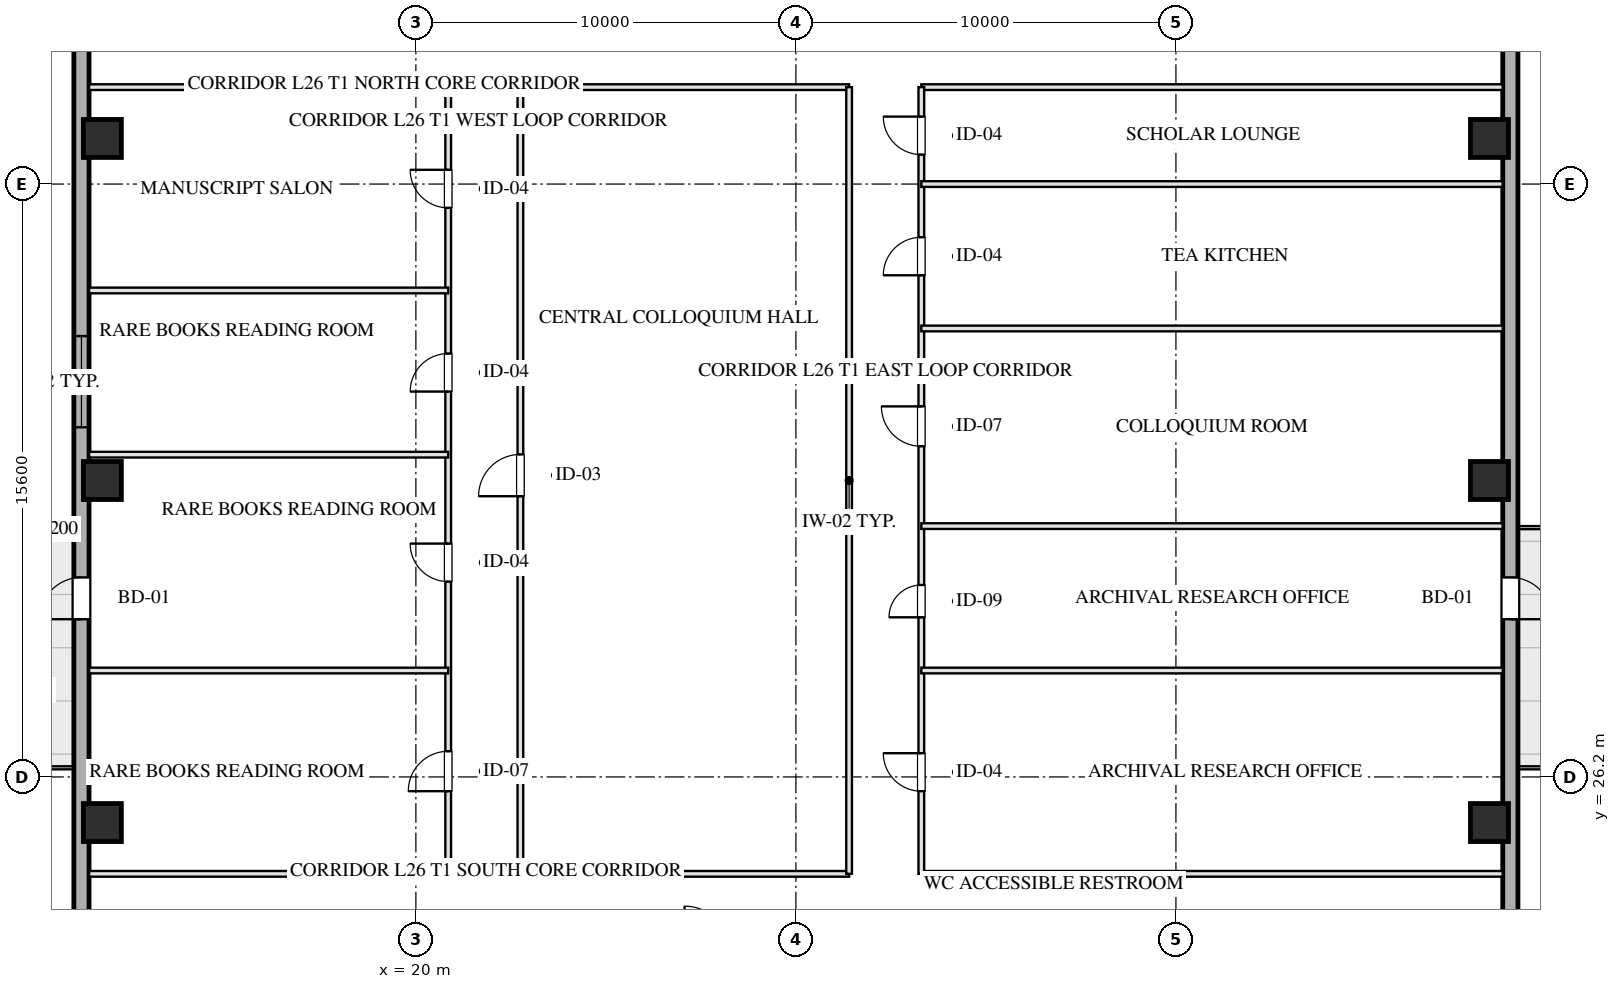
"""IFC4 building model, lengths in metres.
Left out: names, types, materials, properties, quantities, classifications, styles, units other than length and angle.
Written with IfcOpenShell. Run it as: python <this file> out.ifc"""

import sys

from ifc_helpers import new_model, si_unit, direction, frame, frame_2d, origin, origin_2d, place, context, subcontext, project, spatial, rectangle, hollow_rectangle, extrude, element, fill, save


model = new_model("IFC4")
c1 = context("Model", 3, precision=1e-05, world=origin(), true_north=direction((0.0, 1.0)))
c2 = subcontext(c1, "Body", "Model", "MODEL_VIEW")
j1 = project(units=[si_unit("LENGTHUNIT", "METRE"), si_unit("PLANEANGLEUNIT", "RADIAN")], contexts=[c1])
p1 = place(None, origin())
s1 = spatial("IfcSite", under=j1, at=p1, CompositionType="ELEMENT")
p2 = place(p1, origin())
s2 = spatial("IfcBuilding", under=s1, at=p2, CompositionType="ELEMENT")
p3 = place(p2, frame((0.0, 0.0, 103.5)))
s3 = spatial("IfcBuildingStorey", under=s2, at=p3, CompositionType="ELEMENT", Elevation=103.5)
for number, where, z_axis, x_axis in (
    (1, (11.75, 25.0, 0.0), (0.0, 0.0, 1.0), (1.0, 0.0, 0.0)),
    (2, (11.75, 34.0, 0.0), (0.0, 0.0, 1.0), (1.0, 0.0, 0.0)),
    (3, (11.75, 43.0, 0.0), (0.0, 0.0, 1.0), (1.0, 0.0, 0.0)),
    (4, (48.25, 25.0, 0.0), (0.0, 0.0, 1.0), (1.0, 0.0, 0.0)),
    (5, (48.25, 34.0, 0.0), (0.0, 0.0, 1.0), (1.0, 0.0, 0.0)),
    (6, (48.25, 43.0, 0.0), (0.0, 0.0, 1.0), (1.0, 0.0, 0.0)),
):
    element("IfcColumn", number, at=place(p3, frame(where, z_axis=z_axis, x_axis=x_axis)), inside=s3, PredefinedType="COLUMN", context=c2, shape_type="SweptSolid", body=[
        extrude(hollow_rectangle(XDim=1.0, YDim=1.0, WallThickness=0.036, at=origin_2d()), origin(), (0.0, 0.0, 1.0), 3.451),
    ])
p4 = place(p3, frame((11.2, 9.0, 0.0), z_axis=(0.0, 0.0, 1.0), x_axis=(0.0, 1.0, 0.0)))
e7 = element("IfcWall", 7, at=p4, inside=s3, PredefinedType="SOLIDWALL", context=c2, shape_type="SweptSolid", body=[
    extrude(rectangle(XDim=50.0, YDim=0.4, at=frame_2d((25.0, 0.0))), origin(), (0.0, 0.0, 1.0), 2.61),
])
p5 = place(p4, frame((26.4, 0.0, 0.75)))
e8 = element("IfcOpeningElement", 8, at=p5, cuts=e7, PredefinedType="OPENING", context=c2, shape_type="SweptSolid", body=[
    extrude(rectangle(XDim=2.4, YDim=1.46, at=frame_2d((1.2, 0.73))), frame((0.0, 0.21, 0.0), z_axis=(0.0, -1.0, 0.0), x_axis=(1.0, 0.0, 0.0)), (0.0, 0.0, 1.0), 0.42),
])
p6 = place(p4, frame((21.35, 0.0, 0.0)))
e9 = element("IfcOpeningElement", 9, at=p6, cuts=e7, PredefinedType="OPENING", context=c2, shape_type="SweptSolid", body=[
    extrude(rectangle(XDim=1.1, YDim=2.15, at=frame_2d((0.55, 1.075))), frame((0.0, 0.21, 0.0), z_axis=(0.0, -1.0, 0.0), x_axis=(1.0, 0.0, 0.0)), (0.0, 0.0, 1.0), 0.42),
])
p7 = place(p3, frame((48.8, 59.0, 0.0), z_axis=(0.0, 0.0, 1.0), x_axis=(0.0, -1.0, 0.0)))
e10 = element("IfcWall", 10, at=p7, inside=s3, PredefinedType="SOLIDWALL", context=c2, shape_type="SweptSolid", body=[
    extrude(rectangle(XDim=50.0, YDim=0.4, at=frame_2d((25.0, 0.0))), origin(), (0.0, 0.0, 1.0), 2.61),
])
p8 = place(p7, frame((27.55, 0.0, 0.0)))
e11 = element("IfcOpeningElement", 11, at=p8, cuts=e10, PredefinedType="OPENING", context=c2, shape_type="SweptSolid", body=[
    extrude(rectangle(XDim=1.1, YDim=2.15, at=frame_2d((0.55, 1.075))), frame((0.0, 0.21, 0.0), z_axis=(0.0, -1.0, 0.0), x_axis=(1.0, 0.0, 0.0)), (0.0, 0.0, 1.0), 0.42),
])
p9 = place(p3, frame((11.4, 23.65, 0.0), z_axis=(0.0, 0.0, 1.0), x_axis=(1.0, 0.0, 0.0)))
e12 = element("IfcWall", 12, at=p9, inside=s3, PredefinedType="PARTITIONING", context=c2, shape_type="SweptSolid", body=[
    extrude(rectangle(XDim=9.45, YDim=0.15, at=frame_2d((4.725, 0.0))), origin(), (0.0, 0.0, 1.0), 3.175),
])
p10 = place(p3, frame((22.75, 23.65, 0.0), z_axis=(0.0, 0.0, 1.0), x_axis=(1.0, 0.0, 0.0)))
e13 = element("IfcWall", 13, at=p10, inside=s3, PredefinedType="PARTITIONING", context=c2, shape_type="SweptSolid", body=[
    extrude(rectangle(XDim=8.65, YDim=0.15, at=frame_2d((4.325, 0.0))), origin(), (0.0, 0.0, 1.0), 3.175),
])
p11 = place(p3, frame((33.3, 23.65, 0.0), z_axis=(0.0, 0.0, 1.0), x_axis=(1.0, 0.0, 0.0)))
e14 = element("IfcWall", 14, at=p11, inside=s3, PredefinedType="PARTITIONING", context=c2, shape_type="SweptSolid", body=[
    extrude(rectangle(XDim=15.3, YDim=0.15, at=frame_2d((7.65, 0.0))), origin(), (0.0, 0.0, 1.0), 3.175),
])
p12 = place(p3, frame((11.4, 44.35, 0.0), z_axis=(0.0, 0.0, 1.0), x_axis=(1.0, 0.0, 0.0)))
e15 = element("IfcWall", 15, at=p12, inside=s3, PredefinedType="PARTITIONING", context=c2, shape_type="SweptSolid", body=[
    extrude(rectangle(XDim=9.45, YDim=0.15, at=frame_2d((4.725, 0.0))), origin(), (0.0, 0.0, 1.0), 3.175),
])
p13 = place(p3, frame((22.75, 44.35, 0.0), z_axis=(0.0, 0.0, 1.0), x_axis=(1.0, 0.0, 0.0)))
e16 = element("IfcWall", 16, at=p13, inside=s3, PredefinedType="PARTITIONING", context=c2, shape_type="SweptSolid", body=[
    extrude(rectangle(XDim=8.65, YDim=0.15, at=frame_2d((4.325, 0.0))), origin(), (0.0, 0.0, 1.0), 3.175),
])
p14 = place(p3, frame((33.3, 44.35, 0.0), z_axis=(0.0, 0.0, 1.0), x_axis=(1.0, 0.0, 0.0)))
e17 = element("IfcWall", 17, at=p14, inside=s3, PredefinedType="PARTITIONING", context=c2, shape_type="SweptSolid", body=[
    extrude(rectangle(XDim=15.3, YDim=0.15, at=frame_2d((7.65, 0.0))), origin(), (0.0, 0.0, 1.0), 3.175),
])
p15 = place(p3, frame((20.85, 23.65, 0.0), z_axis=(0.0, 0.0, 1.0), x_axis=(0.0, 1.0, 0.0)))
e18 = element("IfcWall", 18, at=p15, inside=s3, PredefinedType="PARTITIONING", context=c2, shape_type="SweptSolid", body=[
    extrude(rectangle(XDim=20.7, YDim=0.15, at=frame_2d((10.35, 0.0))), origin(), (0.0, 0.0, 1.0), 3.175),
])
p16 = place(p15, frame((2.175, 0.0, 0.0)))
e19 = element("IfcOpeningElement", 19, at=p16, cuts=e18, PredefinedType="OPENING", context=c2, shape_type="SweptSolid", body=[
    extrude(rectangle(XDim=1.05, YDim=2.05, at=frame_2d((0.525, 1.025))), frame((0.0, 0.085, 0.0), z_axis=(0.0, -1.0, 0.0), x_axis=(1.0, 0.0, 0.0)), (0.0, 0.0, 1.0), 0.17),
])
p17 = place(p15, frame((7.69, 0.0, 0.0)))
e20 = element("IfcOpeningElement", 20, at=p17, cuts=e18, PredefinedType="OPENING", context=c2, shape_type="SweptSolid", body=[
    extrude(rectangle(XDim=1.0, YDim=2.05, at=frame_2d((0.5, 1.025))), frame((0.0, 0.085, 0.0), z_axis=(0.0, -1.0, 0.0), x_axis=(1.0, 0.0, 0.0)), (0.0, 0.0, 1.0), 0.17),
])
p18 = place(p15, frame((12.69, 0.0, 0.0)))
e21 = element("IfcOpeningElement", 21, at=p18, cuts=e18, PredefinedType="OPENING", context=c2, shape_type="SweptSolid", body=[
    extrude(rectangle(XDim=1.0, YDim=2.05, at=frame_2d((0.5, 1.025))), frame((0.0, 0.085, 0.0), z_axis=(0.0, -1.0, 0.0), x_axis=(1.0, 0.0, 0.0)), (0.0, 0.0, 1.0), 0.17),
])
p19 = place(p15, frame((17.525, 0.0, 0.0)))
e22 = element("IfcOpeningElement", 22, at=p19, cuts=e18, PredefinedType="OPENING", context=c2, shape_type="SweptSolid", body=[
    extrude(rectangle(XDim=1.0, YDim=2.05, at=frame_2d((0.5, 1.025))), frame((0.0, 0.085, 0.0), z_axis=(0.0, -1.0, 0.0), x_axis=(1.0, 0.0, 0.0)), (0.0, 0.0, 1.0), 0.17),
])
p20 = place(p3, frame((22.75, 23.65, 0.0), z_axis=(0.0, 0.0, 1.0), x_axis=(0.0, 1.0, 0.0)))
e23 = element("IfcWall", 23, at=p20, inside=s3, PredefinedType="PARTITIONING", context=c2, shape_type="SweptSolid", body=[
    extrude(rectangle(XDim=20.7, YDim=0.15, at=frame_2d((10.35, 0.0))), origin(), (0.0, 0.0, 1.0), 3.175),
])
p21 = place(p20, frame((9.936, 0.0, 0.0)))
e24 = element("IfcOpeningElement", 24, at=p21, cuts=e23, PredefinedType="OPENING", context=c2, shape_type="SweptSolid", body=[
    extrude(rectangle(XDim=1.1, YDim=2.05, at=frame_2d((0.55, 1.025))), frame((0.0, 0.085, 0.0), z_axis=(0.0, -1.0, 0.0), x_axis=(1.0, 0.0, 0.0)), (0.0, 0.0, 1.0), 0.17),
])
p22 = place(p3, frame((31.4, 23.65, 0.0), z_axis=(0.0, 0.0, 1.0), x_axis=(0.0, 1.0, 0.0)))
e25 = element("IfcWall", 25, at=p22, inside=s3, PredefinedType="PARTITIONING", context=c2, shape_type="SweptSolid", body=[
    extrude(rectangle(XDim=20.7, YDim=0.15, at=frame_2d((10.35, 0.0))), origin(), (0.0, 0.0, 1.0), 3.175),
])
p23 = place(p3, frame((33.3, 23.65, 0.0), z_axis=(0.0, 0.0, 1.0), x_axis=(0.0, 1.0, 0.0)))
e26 = element("IfcWall", 26, at=p23, inside=s3, PredefinedType="PARTITIONING", context=c2, shape_type="SweptSolid", body=[
    extrude(rectangle(XDim=20.7, YDim=0.15, at=frame_2d((10.35, 0.0))), origin(), (0.0, 0.0, 1.0), 3.175),
])
p24 = place(p23, frame((2.175, 0.0, 0.0)))
e27 = element("IfcOpeningElement", 27, at=p24, cuts=e26, PredefinedType="OPENING", context=c2, shape_type="SweptSolid", body=[
    extrude(rectangle(XDim=1.0, YDim=2.05, at=frame_2d((0.5, 1.025))), frame((0.0, 0.085, 0.0), z_axis=(0.0, -1.0, 0.0), x_axis=(1.0, 0.0, 0.0)), (0.0, 0.0, 1.0), 0.17),
])
p25 = place(p23, frame((6.75, 0.0, 0.0)))
e28 = element("IfcOpeningElement", 28, at=p25, cuts=e26, PredefinedType="OPENING", context=c2, shape_type="SweptSolid", body=[
    extrude(rectangle(XDim=0.85, YDim=2.05, at=frame_2d((0.425, 1.025))), frame((0.0, 0.085, 0.0), z_axis=(0.0, -1.0, 0.0), x_axis=(1.0, 0.0, 0.0)), (0.0, 0.0, 1.0), 0.17),
])
p26 = place(p23, frame((11.25, 0.0, 0.0)))
e29 = element("IfcOpeningElement", 29, at=p26, cuts=e26, PredefinedType="OPENING", context=c2, shape_type="SweptSolid", body=[
    extrude(rectangle(XDim=1.05, YDim=2.05, at=frame_2d((0.525, 1.025))), frame((0.0, 0.085, 0.0), z_axis=(0.0, -1.0, 0.0), x_axis=(1.0, 0.0, 0.0)), (0.0, 0.0, 1.0), 0.17),
])
p27 = place(p23, frame((15.75, 0.0, 0.0)))
e30 = element("IfcOpeningElement", 30, at=p27, cuts=e26, PredefinedType="OPENING", context=c2, shape_type="SweptSolid", body=[
    extrude(rectangle(XDim=1.0, YDim=2.05, at=frame_2d((0.5, 1.025))), frame((0.0, 0.085, 0.0), z_axis=(0.0, -1.0, 0.0), x_axis=(1.0, 0.0, 0.0)), (0.0, 0.0, 1.0), 0.17),
])
p28 = place(p23, frame((18.925, 0.0, 0.0)))
e31 = element("IfcOpeningElement", 31, at=p28, cuts=e26, PredefinedType="OPENING", context=c2, shape_type="SweptSolid", body=[
    extrude(rectangle(XDim=1.0, YDim=2.05, at=frame_2d((0.5, 1.025))), frame((0.0, 0.085, 0.0), z_axis=(0.0, -1.0, 0.0), x_axis=(1.0, 0.0, 0.0)), (0.0, 0.0, 1.0), 0.17),
])
for number, where, z_axis, x_axis in (
    (32, (11.4, 29.0, 0.0), (0.0, 0.0, 1.0), (1.0, 0.0, 0.0)),
    (33, (11.4, 34.68, 0.0), (0.0, 0.0, 1.0), (1.0, 0.0, 0.0)),
    (34, (11.4, 39.0, 0.0), (0.0, 0.0, 1.0), (1.0, 0.0, 0.0)),
):
    element("IfcWall", number, at=place(p3, frame(where, z_axis=z_axis, x_axis=x_axis)), inside=s3, PredefinedType="PARTITIONING", context=c2, shape_type="SweptSolid", body=[
        extrude(rectangle(XDim=9.45, YDim=0.15, at=frame_2d((4.725, 0.0))), origin(), (0.0, 0.0, 1.0), 3.175),
    ])
for number, where, z_axis, x_axis in (
    (35, (33.3, 29.0, 0.0), (0.0, 0.0, 1.0), (1.0, 0.0, 0.0)),
    (36, (33.3, 32.8, 0.0), (0.0, 0.0, 1.0), (1.0, 0.0, 0.0)),
    (37, (33.3, 38.0, 0.0), (0.0, 0.0, 1.0), (1.0, 0.0, 0.0)),
    (38, (33.3, 41.8, 0.0), (0.0, 0.0, 1.0), (1.0, 0.0, 0.0)),
):
    element("IfcWall", number, at=place(p3, frame(where, z_axis=z_axis, x_axis=x_axis)), inside=s3, PredefinedType="PARTITIONING", context=c2, shape_type="SweptSolid", body=[
        extrude(rectangle(XDim=15.3, YDim=0.15, at=frame_2d((7.65, 0.0))), origin(), (0.0, 0.0, 1.0), 3.175),
    ])
p29 = place(p5, origin())
e39 = element("IfcWindow", 39, at=p29, inside=s3, PartitioningType="TRIPLE_PANEL_VERTICAL", PredefinedType="WINDOW", context=c2, shape_type="SweptSolid", body=[
    extrude(rectangle(XDim=2.4, YDim=1.46, at=frame_2d((1.2, 0.73))), frame((0.0, 0.03, 0.0), z_axis=(0.0, -1.0, 0.0), x_axis=(1.0, 0.0, 0.0)), (0.0, 0.0, 1.0), 0.06),
])
fill(e8, e39)
p30 = place(p6, origin())
e40 = element("IfcDoor", 40, at=p30, inside=s3, OperationType="SINGLE_SWING_LEFT", PredefinedType="DOOR", context=c2, shape_type="SweptSolid", body=[
    extrude(rectangle(XDim=1.1, YDim=2.15, at=frame_2d((0.55, 1.075))), frame((0.0, 0.025, 0.0), z_axis=(0.0, -1.0, 0.0), x_axis=(1.0, 0.0, 0.0)), (0.0, 0.0, 1.0), 0.05),
])
fill(e9, e40)
p31 = place(p8, origin())
e41 = element("IfcDoor", 41, at=p31, inside=s3, OperationType="SINGLE_SWING_RIGHT", PredefinedType="DOOR", context=c2, shape_type="SweptSolid", body=[
    extrude(rectangle(XDim=1.1, YDim=2.15, at=frame_2d((0.55, 1.075))), frame((0.0, 0.025, 0.0), z_axis=(0.0, -1.0, 0.0), x_axis=(1.0, 0.0, 0.0)), (0.0, 0.0, 1.0), 0.05),
])
fill(e11, e41)
p32 = place(p16, origin())
e42 = element("IfcDoor", 42, at=p32, inside=s3, OperationType="SINGLE_SWING_LEFT", PredefinedType="DOOR", context=c2, shape_type="SweptSolid", body=[
    extrude(rectangle(XDim=1.05, YDim=2.05, at=frame_2d((0.525, 1.025))), frame((0.0, 0.025, 0.0), z_axis=(0.0, -1.0, 0.0), x_axis=(1.0, 0.0, 0.0)), (0.0, 0.0, 1.0), 0.05),
])
fill(e19, e42)
p33 = place(p17, origin())
e43 = element("IfcDoor", 43, at=p33, inside=s3, OperationType="SINGLE_SWING_RIGHT", PredefinedType="DOOR", context=c2, shape_type="SweptSolid", body=[
    extrude(rectangle(XDim=1.0, YDim=2.05, at=frame_2d((0.5, 1.025))), frame((0.0, 0.025, 0.0), z_axis=(0.0, -1.0, 0.0), x_axis=(1.0, 0.0, 0.0)), (0.0, 0.0, 1.0), 0.05),
])
fill(e20, e43)
p34 = place(p18, origin())
e44 = element("IfcDoor", 44, at=p34, inside=s3, OperationType="SINGLE_SWING_LEFT", PredefinedType="DOOR", context=c2, shape_type="SweptSolid", body=[
    extrude(rectangle(XDim=1.0, YDim=2.05, at=frame_2d((0.5, 1.025))), frame((0.0, 0.025, 0.0), z_axis=(0.0, -1.0, 0.0), x_axis=(1.0, 0.0, 0.0)), (0.0, 0.0, 1.0), 0.05),
])
fill(e21, e44)
p35 = place(p19, origin())
e45 = element("IfcDoor", 45, at=p35, inside=s3, OperationType="SINGLE_SWING_RIGHT", PredefinedType="DOOR", context=c2, shape_type="SweptSolid", body=[
    extrude(rectangle(XDim=1.0, YDim=2.05, at=frame_2d((0.5, 1.025))), frame((0.0, 0.025, 0.0), z_axis=(0.0, -1.0, 0.0), x_axis=(1.0, 0.0, 0.0)), (0.0, 0.0, 1.0), 0.05),
])
fill(e22, e45)
p36 = place(p21, origin())
e46 = element("IfcDoor", 46, at=p36, inside=s3, OperationType="SINGLE_SWING_LEFT", PredefinedType="DOOR", context=c2, shape_type="SweptSolid", body=[
    extrude(rectangle(XDim=1.1, YDim=2.05, at=frame_2d((0.55, 1.025))), frame((0.0, 0.025, 0.0), z_axis=(0.0, -1.0, 0.0), x_axis=(1.0, 0.0, 0.0)), (0.0, 0.0, 1.0), 0.05),
])
fill(e24, e46)
p37 = place(p24, origin())
e47 = element("IfcDoor", 47, at=p37, inside=s3, OperationType="SINGLE_SWING_RIGHT", PredefinedType="DOOR", context=c2, shape_type="SweptSolid", body=[
    extrude(rectangle(XDim=1.0, YDim=2.05, at=frame_2d((0.5, 1.025))), frame((0.0, 0.025, 0.0), z_axis=(0.0, -1.0, 0.0), x_axis=(1.0, 0.0, 0.0)), (0.0, 0.0, 1.0), 0.05),
])
fill(e27, e47)
p38 = place(p25, origin())
e48 = element("IfcDoor", 48, at=p38, inside=s3, OperationType="SINGLE_SWING_LEFT", PredefinedType="DOOR", context=c2, shape_type="SweptSolid", body=[
    extrude(rectangle(XDim=0.85, YDim=2.05, at=frame_2d((0.425, 1.025))), frame((0.0, 0.025, 0.0), z_axis=(0.0, -1.0, 0.0), x_axis=(1.0, 0.0, 0.0)), (0.0, 0.0, 1.0), 0.05),
])
fill(e28, e48)
p39 = place(p26, origin())
e49 = element("IfcDoor", 49, at=p39, inside=s3, OperationType="SINGLE_SWING_RIGHT", PredefinedType="DOOR", context=c2, shape_type="SweptSolid", body=[
    extrude(rectangle(XDim=1.05, YDim=2.05, at=frame_2d((0.525, 1.025))), frame((0.0, 0.025, 0.0), z_axis=(0.0, -1.0, 0.0), x_axis=(1.0, 0.0, 0.0)), (0.0, 0.0, 1.0), 0.05),
])
fill(e29, e49)
p40 = place(p27, origin())
e50 = element("IfcDoor", 50, at=p40, inside=s3, OperationType="SINGLE_SWING_LEFT", PredefinedType="DOOR", context=c2, shape_type="SweptSolid", body=[
    extrude(rectangle(XDim=1.0, YDim=2.05, at=frame_2d((0.5, 1.025))), frame((0.0, 0.025, 0.0), z_axis=(0.0, -1.0, 0.0), x_axis=(1.0, 0.0, 0.0)), (0.0, 0.0, 1.0), 0.05),
])
fill(e30, e50)
p41 = place(p28, origin())
e51 = element("IfcDoor", 51, at=p41, inside=s3, OperationType="SINGLE_SWING_RIGHT", PredefinedType="DOOR", context=c2, shape_type="SweptSolid", body=[
    extrude(rectangle(XDim=1.0, YDim=2.05, at=frame_2d((0.5, 1.025))), frame((0.0, 0.025, 0.0), z_axis=(0.0, -1.0, 0.0), x_axis=(1.0, 0.0, 0.0)), (0.0, 0.0, 1.0), 0.05),
])
fill(e31, e51)
save(model, sys.argv[1])
